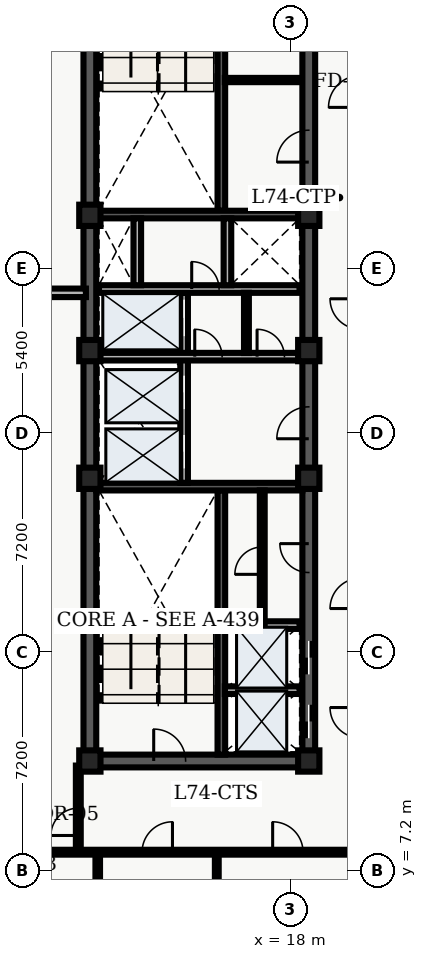
"""IFC4 building model, lengths in metres.
Left out: names, types, materials, properties, quantities, classifications, styles, units other than length and angle.
Written with IfcOpenShell. Run it as: python <this file> out.ifc"""

import sys

from ifc_helpers import new_model, entity, si_unit, converted_unit, direction, frame, origin_with_axes, origin_2d_with_axis, place, context, subcontext, project, spatial, polyline, rectangle, outline, extrude, element, fill, save


model = new_model("IFC4")
c1 = context("Model", 3, precision=1e-05, world=origin_with_axes(), true_north=direction((0.0, 1.0)))
c2 = subcontext(c1, "Body", "Model", "MODEL_VIEW")
j1 = project(units=[si_unit("LENGTHUNIT", "METRE"), converted_unit("PLANEANGLEUNIT", "DEGREE", entity("IfcPlaneAngleMeasure", 0.017), si_unit("PLANEANGLEUNIT", "RADIAN"), dimensions=[0, 0, 0, 0, 0, 0, 0])], contexts=[c1])
p1 = place(None, origin_with_axes())
s1 = spatial("IfcSite", under=j1, at=p1, CompositionType="ELEMENT")
p2 = place(p1, origin_with_axes())
s2 = spatial("IfcBuilding", under=s1, at=p2, CompositionType="ELEMENT")
p3 = place(p2, frame((0.0, 0.0, 299.7), z_axis=(0.0, 0.0, 1.0), x_axis=(1.0, 0.0, 0.0)))
s3 = spatial("IfcBuildingStorey", under=s2, at=p3, CompositionType="ELEMENT", Elevation=299.7)
p4 = place(p3, frame((11.4, 10.8, 0.0), z_axis=(0.0, 0.0, 1.0), x_axis=(0.0, 1.0, 0.0)))
e1 = element("IfcWall", 1, at=p4, inside=s3, PredefinedType="SHEAR", context=c2, shape_type="SweptSolid", body=[
    extrude(outline(polyline([(0.0, -0.21), (27.0, -0.21), (27.0, 0.21), (0.0, 0.21), (0.0, -0.21)])), origin_with_axes(), (0.0, 0.0, 1.0), 3.6),
])
p5 = place(p3, frame((11.4, 10.8, 0.0), z_axis=(0.0, 0.0, 1.0), x_axis=(1.0, 0.0, 0.0)))
e2 = element("IfcWall", 2, at=p5, inside=s3, PredefinedType="SHEAR", context=c2, shape_type="SweptSolid", body=[
    extrude(outline(polyline([(0.0, -0.21), (7.2, -0.21), (7.2, 0.21), (0.0, 0.21), (0.0, -0.21)])), origin_with_axes(), (0.0, 0.0, 1.0), 3.6),
])
p6 = place(p5, frame((2.625, 0.0, 0.0), z_axis=(0.0, 0.0, 1.0), x_axis=(1.0, 0.0, 0.0)))
e3 = element("IfcOpeningElement", 3, at=p6, cuts=e2, PredefinedType="OPENING", context=c2, shape_type="SweptSolid", body=[
    extrude(rectangle(XDim=1.05, YDim=0.44, at=origin_2d_with_axis()), origin_with_axes(), (0.0, 0.0, 1.0), 2.15),
])
p7 = place(p3, frame((18.6, 10.8, 0.0), z_axis=(0.0, 0.0, 1.0), x_axis=(0.0, 1.0, 0.0)))
e4 = element("IfcWall", 4, at=p7, inside=s3, PredefinedType="SHEAR", context=c2, shape_type="SweptSolid", body=[
    extrude(outline(polyline([(0.0, -0.21), (13.5, -0.21), (13.5, 0.21), (0.0, 0.21), (0.0, -0.21)])), origin_with_axes(), (0.0, 0.0, 1.0), 3.6),
])
p8 = place(p7, frame((1.3, 0.0, 0.0), z_axis=(0.0, 0.0, 1.0), x_axis=(1.0, 0.0, 0.0)))
e5 = element("IfcOpeningElement", 5, at=p8, cuts=e4, PredefinedType="OPENING", context=c2, shape_type="SweptSolid", body=[
    extrude(rectangle(XDim=1.1, YDim=0.44, at=origin_2d_with_axis()), origin_with_axes(), (0.0, 0.0, 1.0), 2.15),
])
p9 = place(p7, frame((3.4, 0.0, 0.0), z_axis=(0.0, 0.0, 1.0), x_axis=(1.0, 0.0, 0.0)))
e6 = element("IfcOpeningElement", 6, at=p9, cuts=e4, PredefinedType="OPENING", context=c2, shape_type="SweptSolid", body=[
    extrude(rectangle(XDim=1.1, YDim=0.44, at=origin_2d_with_axis()), origin_with_axes(), (0.0, 0.0, 1.0), 2.15),
])
p10 = place(p7, frame((11.125, 0.0, 0.0), z_axis=(0.0, 0.0, 1.0), x_axis=(1.0, 0.0, 0.0)))
e7 = element("IfcOpeningElement", 7, at=p10, cuts=e4, PredefinedType="OPENING", context=c2, shape_type="SweptSolid", body=[
    extrude(rectangle(XDim=1.05, YDim=0.44, at=origin_2d_with_axis()), origin_with_axes(), (0.0, 0.0, 1.0), 2.15),
])
p11 = place(p7, frame((6.675, 0.0, 0.0), z_axis=(0.0, 0.0, 1.0), x_axis=(1.0, 0.0, 0.0)))
e8 = element("IfcOpeningElement", 8, at=p11, cuts=e4, PredefinedType="OPENING", context=c2, shape_type="SweptSolid", body=[
    extrude(rectangle(XDim=0.95, YDim=0.44, at=origin_2d_with_axis()), origin_with_axes(), (0.0, 0.0, 1.0), 2.15),
])
p12 = place(p3, frame((18.6, 24.3, 0.0), z_axis=(0.0, 0.0, 1.0), x_axis=(0.0, 1.0, 0.0)))
e9 = element("IfcWall", 9, at=p12, inside=s3, PredefinedType="SHEAR", context=c2, shape_type="SweptSolid", body=[
    extrude(outline(polyline([(0.0, -0.21), (13.5, -0.21), (13.5, 0.21), (0.0, 0.21), (0.0, -0.21)])), origin_with_axes(), (0.0, 0.0, 1.0), 3.6),
])
p13 = place(p12, frame((6.725, 0.0, 0.0), z_axis=(0.0, 0.0, 1.0), x_axis=(1.0, 0.0, 0.0)))
e10 = element("IfcOpeningElement", 10, at=p13, cuts=e9, PredefinedType="OPENING", context=c2, shape_type="SweptSolid", body=[
    extrude(rectangle(XDim=1.05, YDim=0.44, at=origin_2d_with_axis()), origin_with_axes(), (0.0, 0.0, 1.0), 2.15),
])
p14 = place(p12, frame((11.125, 0.0, 0.0), z_axis=(0.0, 0.0, 1.0), x_axis=(1.0, 0.0, 0.0)))
e11 = element("IfcOpeningElement", 11, at=p14, cuts=e9, PredefinedType="OPENING", context=c2, shape_type="SweptSolid", body=[
    extrude(rectangle(XDim=1.05, YDim=0.44, at=origin_2d_with_axis()), origin_with_axes(), (0.0, 0.0, 1.0), 2.15),
])
p15 = place(p3, frame((15.725, 11.01, 0.0), z_axis=(0.0, 0.0, 1.0), x_axis=(0.0, 1.0, 0.0)))
e12 = element("IfcWall", 12, at=p15, inside=s3, PredefinedType="SHEAR", context=c2, shape_type="SweptSolid", body=[
    extrude(outline(polyline([(0.0, -0.125), (8.69, -0.125), (8.69, 0.125), (0.0, 0.125), (0.0, -0.125)])), origin_with_axes(), (0.0, 0.0, 1.0), 3.6),
])
p16 = place(p3, frame((11.61, 19.825, 0.0), z_axis=(0.0, 0.0, 1.0), x_axis=(1.0, 0.0, 0.0)))
e13 = element("IfcWall", 13, at=p16, inside=s3, PredefinedType="SHEAR", context=c2, shape_type="SweptSolid", body=[
    extrude(outline(polyline([(0.0, -0.125), (6.78, -0.125), (6.78, 0.125), (0.0, 0.125), (0.0, -0.125)])), origin_with_axes(), (0.0, 0.0, 1.0), 3.6),
])
p17 = place(p3, frame((15.725, 28.9, 0.0), z_axis=(0.0, 0.0, 1.0), x_axis=(0.0, 1.0, 0.0)))
e14 = element("IfcWall", 14, at=p17, inside=s3, PredefinedType="SHEAR", context=c2, shape_type="SweptSolid", body=[
    extrude(outline(polyline([(0.0, -0.125), (8.69, -0.125), (8.69, 0.125), (0.0, 0.125), (0.0, -0.125)])), origin_with_axes(), (0.0, 0.0, 1.0), 3.6),
])
p18 = place(p3, frame((11.61, 28.775, 0.0), z_axis=(0.0, 0.0, 1.0), x_axis=(1.0, 0.0, 0.0)))
e15 = element("IfcWall", 15, at=p18, inside=s3, PredefinedType="SHEAR", context=c2, shape_type="SweptSolid", body=[
    extrude(outline(polyline([(0.0, -0.125), (6.78, -0.125), (6.78, 0.125), (0.0, 0.125), (0.0, -0.125)])), origin_with_axes(), (0.0, 0.0, 1.0), 3.6),
])
p19 = place(p3, frame((14.5, 19.95, 0.0), z_axis=(0.0, 0.0, 1.0), x_axis=(0.0, 1.0, 0.0)))
e16 = element("IfcWall", 16, at=p19, inside=s3, PredefinedType="SOLIDWALL", context=c2, shape_type="SweptSolid", body=[
    extrude(outline(polyline([(0.0, -0.125), (6.25, -0.125), (6.25, 0.125), (0.0, 0.125), (0.0, -0.125)])), origin_with_axes(), (0.0, 0.0, 1.0), 2.64),
])
p20 = place(p19, frame((1.025, 0.0, 0.0), z_axis=(0.0, 0.0, 1.0), x_axis=(1.0, 0.0, 0.0)))
e17 = element("IfcOpeningElement", 17, at=p20, cuts=e16, PredefinedType="OPENING", context=c2, shape_type="SweptSolid", body=[
    extrude(rectangle(XDim=1.1, YDim=0.27, at=origin_2d_with_axis()), origin_with_axes(), (0.0, 0.0, 1.0), 2.15),
])
p21 = place(p19, frame((2.975, 0.0, 0.0), z_axis=(0.0, 0.0, 1.0), x_axis=(1.0, 0.0, 0.0)))
e18 = element("IfcOpeningElement", 18, at=p21, cuts=e16, PredefinedType="OPENING", context=c2, shape_type="SweptSolid", body=[
    extrude(rectangle(XDim=1.1, YDim=0.27, at=origin_2d_with_axis()), origin_with_axes(), (0.0, 0.0, 1.0), 2.15),
])
p22 = place(p19, frame((5.425, 0.0, 0.0), z_axis=(0.0, 0.0, 1.0), x_axis=(1.0, 0.0, 0.0)))
e19 = element("IfcOpeningElement", 19, at=p22, cuts=e16, PredefinedType="OPENING", context=c2, shape_type="SweptSolid", body=[
    extrude(rectangle(XDim=1.2, YDim=0.27, at=origin_2d_with_axis()), origin_with_axes(), (0.0, 0.0, 1.0), 2.15),
])
p23 = place(p3, frame((11.7, 24.1, 0.0), z_axis=(0.0, 0.0, 1.0), x_axis=(1.0, 0.0, 0.0)))
e20 = element("IfcWall", 20, at=p23, inside=s3, PredefinedType="SOLIDWALL", context=c2, shape_type="SweptSolid", body=[
    extrude(outline(polyline([(0.0, -0.125), (6.6, -0.125), (6.6, 0.125), (0.0, 0.125), (0.0, -0.125)])), origin_with_axes(), (0.0, 0.0, 1.0), 2.64),
])
p24 = place(p23, frame((3.6, 0.0, 0.0), z_axis=(0.0, 0.0, 1.0), x_axis=(1.0, 0.0, 0.0)))
e21 = element("IfcOpeningElement", 21, at=p24, cuts=e20, PredefinedType="OPENING", context=c2, shape_type="SweptSolid", body=[
    extrude(rectangle(XDim=0.9, YDim=0.27, at=origin_2d_with_axis()), origin_with_axes(), (0.0, 0.0, 1.0), 2.15),
])
p25 = place(p23, frame((5.65, 0.0, 0.0), z_axis=(0.0, 0.0, 1.0), x_axis=(1.0, 0.0, 0.0)))
e22 = element("IfcOpeningElement", 22, at=p25, cuts=e20, PredefinedType="OPENING", context=c2, shape_type="SweptSolid", body=[
    extrude(rectangle(XDim=0.9, YDim=0.27, at=origin_2d_with_axis()), origin_with_axes(), (0.0, 0.0, 1.0), 2.15),
])
p26 = place(p3, frame((11.7, 26.325, 0.0), z_axis=(0.0, 0.0, 1.0), x_axis=(1.0, 0.0, 0.0)))
e23 = element("IfcWall", 23, at=p26, inside=s3, PredefinedType="SOLIDWALL", context=c2, shape_type="SweptSolid", body=[
    extrude(outline(polyline([(0.0, -0.125), (6.6, -0.125), (6.6, 0.125), (0.0, 0.125), (0.0, -0.125)])), origin_with_axes(), (0.0, 0.0, 1.0), 2.64),
])
p27 = place(p26, frame((3.5, 0.0, 0.0), z_axis=(0.0, 0.0, 1.0), x_axis=(1.0, 0.0, 0.0)))
e24 = element("IfcOpeningElement", 24, at=p27, cuts=e23, PredefinedType="OPENING", context=c2, shape_type="SweptSolid", body=[
    extrude(rectangle(XDim=0.9, YDim=0.27, at=origin_2d_with_axis()), origin_with_axes(), (0.0, 0.0, 1.0), 2.15),
])
for number, where, z_axis, x_axis in (
    (25, (12.96, 26.45, 0.0), (0.0, 0.0, 1.0), (0.0, 1.0, 0.0)),
    (26, (15.925, 26.45, 0.0), (0.0, 0.0, 1.0), (0.0, 1.0, 0.0)),
):
    element("IfcWall", number, at=place(p3, frame(where, z_axis=z_axis, x_axis=x_axis)), inside=s3, PredefinedType="SOLIDWALL", context=c2, shape_type="SweptSolid", body=[
        extrude(outline(polyline([(0.0, -0.125), (2.2, -0.125), (2.2, 0.125), (0.0, 0.125), (0.0, -0.125)])), origin_with_axes(), (0.0, 0.0, 1.0), 2.64),
    ])
for number, where, z_axis, x_axis in (
    (27, (11.4, 10.8, 0.0), (0.0, 0.0, 1.0), (1.0, 0.0, 0.0)),
    (28, (11.4, 20.1, 0.0), (0.0, 0.0, 1.0), (1.0, 0.0, 0.0)),
    (29, (11.4, 24.3, 0.0), (0.0, 0.0, 1.0), (1.0, 0.0, 0.0)),
    (30, (11.4, 28.75, 0.0), (0.0, 0.0, 1.0), (1.0, 0.0, 0.0)),
    (31, (18.6, 10.8, 0.0), (0.0, 0.0, 1.0), (1.0, 0.0, 0.0)),
    (32, (18.6, 20.1, 0.0), (0.0, 0.0, 1.0), (1.0, 0.0, 0.0)),
    (33, (18.6, 24.3, 0.0), (0.0, 0.0, 1.0), (1.0, 0.0, 0.0)),
    (34, (18.6, 28.75, 0.0), (0.0, 0.0, 1.0), (1.0, 0.0, 0.0)),
):
    element("IfcColumn", number, at=place(p3, frame(where, z_axis=z_axis, x_axis=x_axis)), inside=s3, PredefinedType="COLUMN", context=c2, shape_type="SweptSolid", body=[
        extrude(rectangle(XDim=0.7, YDim=0.7, at=origin_2d_with_axis()), origin_with_axes(), (0.0, 0.0, 1.0), 3.9),
    ])
p28 = place(p3, frame((16.55, 24.22, 0.0), z_axis=(0.0, 0.0, 1.0), x_axis=(0.0, 1.0, 0.0)))
e35 = element("IfcWall", 35, at=p28, inside=s3, PredefinedType="PARTITIONING", context=c2, shape_type="SweptSolid", body=[
    extrude(outline(polyline([(0.0, -0.08), (1.98, -0.08), (1.98, 0.08), (0.0, 0.08), (0.0, -0.08)])), origin_with_axes(), (0.0, 0.0, 1.0), 2.64),
])
for number, where, z_axis, x_axis in (
    (36, (15.84, 13.13, 0.0), (0.0, 0.0, 1.0), (1.0, 0.0, 0.0)),
    (37, (15.84, 15.27, 0.0), (0.0, 0.0, 1.0), (1.0, 0.0, 0.0)),
):
    element("IfcWall", number, at=place(p3, frame(where, z_axis=z_axis, x_axis=x_axis)), inside=s3, PredefinedType="SOLIDWALL", context=c2, shape_type="SweptSolid", body=[
        extrude(outline(polyline([(0.0, -0.125), (2.46, -0.125), (2.46, 0.125), (0.0, 0.125), (0.0, -0.125)])), origin_with_axes(), (0.0, 0.0, 1.0), 2.64),
    ])
p29 = place(p3, frame((17.07, 15.34, 0.0), z_axis=(0.0, 0.0, 1.0), x_axis=(0.0, 1.0, 0.0)))
e38 = element("IfcWall", 38, at=p29, inside=s3, PredefinedType="PARTITIONING", context=c2, shape_type="SweptSolid", body=[
    extrude(outline(polyline([(0.0, -0.08), (4.36, -0.08), (4.36, 0.08), (0.0, 0.08), (0.0, -0.08)])), origin_with_axes(), (0.0, 0.0, 1.0), 2.64),
])
p30 = place(p29, frame((2.05, 0.0, 0.0), z_axis=(0.0, 0.0, 1.0), x_axis=(1.0, 0.0, 0.0)))
e39 = element("IfcOpeningElement", 39, at=p30, cuts=e38, PredefinedType="OPENING", context=c2, shape_type="SweptSolid", body=[
    extrude(rectangle(XDim=0.9, YDim=0.18, at=origin_2d_with_axis()), origin_with_axes(), (0.0, 0.0, 1.0), 2.15),
])
p31 = place(p3, frame((15.84, 33.2, 0.0), z_axis=(0.0, 0.0, 1.0), x_axis=(1.0, 0.0, 0.0)))
e40 = element("IfcWall", 40, at=p31, inside=s3, PredefinedType="PARTITIONING", context=c2, shape_type="SweptSolid", body=[
    extrude(outline(polyline([(0.0, -0.07), (2.46, -0.07), (2.46, 0.07), (0.0, 0.07), (0.0, -0.07)])), origin_with_axes(), (0.0, 0.0, 1.0), 2.64),
])
p32 = place(p3, frame((8.135, 7.8, 0.0), z_axis=(0.0, 0.0, 1.0), x_axis=(1.0, 0.0, 0.0)))
e41 = element("IfcWall", 41, at=p32, inside=s3, PredefinedType="PARTITIONING", context=c2, shape_type="SweptSolid", body=[
    extrude(outline(polyline([(0.0, -0.08), (12.165, -0.08), (12.165, 0.08), (0.0, 0.08), (0.0, -0.08)])), origin_with_axes(), (0.0, 0.0, 1.0), 2.64),
])
p33 = place(p32, frame((0.89, 0.0, 0.0), z_axis=(0.0, 0.0, 1.0), x_axis=(1.0, 0.0, 0.0)))
e42 = element("IfcOpeningElement", 42, at=p33, cuts=e41, PredefinedType="OPENING", context=c2, shape_type="SweptSolid", body=[
    extrude(rectangle(XDim=1.0, YDim=0.18, at=origin_2d_with_axis()), origin_with_axes(), (0.0, 0.0, 1.0), 2.15),
])
p34 = place(p32, frame((5.482, 0.0, 0.0), z_axis=(0.0, 0.0, 1.0), x_axis=(1.0, 0.0, 0.0)))
e43 = element("IfcOpeningElement", 43, at=p34, cuts=e41, PredefinedType="OPENING", context=c2, shape_type="SweptSolid", body=[
    extrude(rectangle(XDim=1.0, YDim=0.18, at=origin_2d_with_axis()), origin_with_axes(), (0.0, 0.0, 1.0), 2.15),
])
p35 = place(p32, frame((9.777, 0.0, 0.0), z_axis=(0.0, 0.0, 1.0), x_axis=(1.0, 0.0, 0.0)))
e44 = element("IfcOpeningElement", 44, at=p35, cuts=e41, PredefinedType="OPENING", context=c2, shape_type="SweptSolid", body=[
    extrude(rectangle(XDim=1.0, YDim=0.18, at=origin_2d_with_axis()), origin_with_axes(), (0.0, 0.0, 1.0), 2.15),
])
p36 = place(p3, frame((11.02, 7.8, 0.0), z_axis=(0.0, 0.0, 1.0), x_axis=(0.0, 1.0, 0.0)))
e45 = element("IfcWall", 45, at=p36, inside=s3, PredefinedType="PARTITIONING", context=c2, shape_type="SweptSolid", body=[
    extrude(outline(polyline([(0.0, -0.08), (2.85, -0.08), (2.85, 0.08), (0.0, 0.08), (0.0, -0.08)])), origin_with_axes(), (0.0, 0.0, 1.0), 2.64),
])
p37 = place(p36, frame((1.0, 0.0, 0.0), z_axis=(0.0, 0.0, 1.0), x_axis=(1.0, 0.0, 0.0)))
e46 = element("IfcOpeningElement", 46, at=p37, cuts=e45, PredefinedType="OPENING", context=c2, shape_type="SweptSolid", body=[
    extrude(rectangle(XDim=0.9, YDim=0.18, at=origin_2d_with_axis()), origin_with_axes(), (0.0, 0.0, 1.0), 2.15),
])
p38 = place(p3, frame((8.135, 26.2, 0.0), z_axis=(0.0, 0.0, 1.0), x_axis=(1.0, 0.0, 0.0)))
e47 = element("IfcWall", 47, at=p38, inside=s3, PredefinedType="PARTITIONING", context=c2, shape_type="SweptSolid", body=[
    extrude(outline(polyline([(0.0, -0.14), (3.135, -0.14), (3.135, 0.14), (0.0, 0.14), (0.0, -0.14)])), origin_with_axes(), (0.0, 0.0, 1.0), 2.64),
])
p39 = place(p3, frame((11.659, 2.135, 0.0), z_axis=(0.0, 0.0, 1.0), x_axis=(0.0, 1.0, 0.0)))
e48 = element("IfcWall", 48, at=p39, inside=s3, PredefinedType="PARTITIONING", context=c2, shape_type="SweptSolid", body=[
    extrude(outline(polyline([(0.0, -0.075), (5.565, -0.075), (5.565, 0.075), (0.0, 0.075), (0.0, -0.075)])), origin_with_axes(), (0.0, 0.0, 1.0), 2.64),
])
p40 = place(p3, frame((15.575, 2.135, 0.0), z_axis=(0.0, 0.0, 1.0), x_axis=(0.0, 1.0, 0.0)))
e49 = element("IfcWall", 49, at=p40, inside=s3, PredefinedType="PARTITIONING", context=c2, shape_type="SweptSolid", body=[
    extrude(outline(polyline([(0.0, -0.062), (5.565, -0.062), (5.565, 0.062), (0.0, 0.062), (0.0, -0.062)])), origin_with_axes(), (0.0, 0.0, 1.0), 2.64),
])
p41 = place(p7, frame((1.3, 0.0, 0.0), z_axis=(0.0, 0.0, 1.0), x_axis=(1.0, 0.0, 0.0)))
e50 = element("IfcDoor", 50, at=p41, inside=s3, OperationType="SLIDING_TO_LEFT", PredefinedType="DOOR", context=c2, shape_type="SweptSolid", body=[
    extrude(rectangle(XDim=1.1, YDim=0.09, at=origin_2d_with_axis()), origin_with_axes(), (0.0, 0.0, 1.0), 2.15),
])
fill(e5, e50)
p42 = place(p7, frame((3.4, 0.0, 0.0), z_axis=(0.0, 0.0, 1.0), x_axis=(1.0, 0.0, 0.0)))
e51 = element("IfcDoor", 51, at=p42, inside=s3, OperationType="SLIDING_TO_RIGHT", PredefinedType="DOOR", context=c2, shape_type="SweptSolid", body=[
    extrude(rectangle(XDim=1.1, YDim=0.09, at=origin_2d_with_axis()), origin_with_axes(), (0.0, 0.0, 1.0), 2.15),
])
fill(e6, e51)
p43 = place(p19, frame((1.025, 0.0, 0.0), z_axis=(0.0, 0.0, 1.0), x_axis=(1.0, 0.0, 0.0)))
e52 = element("IfcDoor", 52, at=p43, inside=s3, OperationType="SLIDING_TO_LEFT", PredefinedType="DOOR", context=c2, shape_type="SweptSolid", body=[
    extrude(rectangle(XDim=1.1, YDim=0.09, at=origin_2d_with_axis()), origin_with_axes(), (0.0, 0.0, 1.0), 2.15),
])
fill(e17, e52)
p44 = place(p19, frame((2.975, 0.0, 0.0), z_axis=(0.0, 0.0, 1.0), x_axis=(1.0, 0.0, 0.0)))
e53 = element("IfcDoor", 53, at=p44, inside=s3, OperationType="SLIDING_TO_RIGHT", PredefinedType="DOOR", context=c2, shape_type="SweptSolid", body=[
    extrude(rectangle(XDim=1.1, YDim=0.09, at=origin_2d_with_axis()), origin_with_axes(), (0.0, 0.0, 1.0), 2.15),
])
fill(e18, e53)
p45 = place(p19, frame((5.425, 0.0, 0.0), z_axis=(0.0, 0.0, 1.0), x_axis=(1.0, 0.0, 0.0)))
e54 = element("IfcDoor", 54, at=p45, inside=s3, OperationType="DOUBLE_DOOR_SLIDING", PredefinedType="DOOR", context=c2, shape_type="SweptSolid", body=[
    extrude(rectangle(XDim=1.2, YDim=0.09, at=origin_2d_with_axis()), origin_with_axes(), (0.0, 0.0, 1.0), 2.15),
])
fill(e19, e54)
p46 = place(p5, frame((2.625, 0.0, 0.0), z_axis=(0.0, 0.0, 1.0), x_axis=(1.0, 0.0, 0.0)))
e55 = element("IfcDoor", 55, at=p46, inside=s3, OperationType="SINGLE_SWING_LEFT", PredefinedType="DOOR", context=c2, shape_type="SweptSolid", body=[
    extrude(rectangle(XDim=1.05, YDim=0.09, at=origin_2d_with_axis()), origin_with_axes(), (0.0, 0.0, 1.0), 2.15),
])
fill(e3, e55)
p47 = place(p7, frame((11.125, 0.0, 0.0), z_axis=(0.0, 0.0, 1.0), x_axis=(1.0, 0.0, 0.0)))
e56 = element("IfcDoor", 56, at=p47, inside=s3, OperationType="SINGLE_SWING_LEFT", PredefinedType="DOOR", context=c2, shape_type="SweptSolid", body=[
    extrude(rectangle(XDim=1.05, YDim=0.09, at=origin_2d_with_axis()), origin_with_axes(), (0.0, 0.0, 1.0), 2.15),
])
fill(e7, e56)
p48 = place(p23, frame((3.6, 0.0, 0.0), z_axis=(0.0, 0.0, 1.0), x_axis=(1.0, 0.0, 0.0)))
e57 = element("IfcDoor", 57, at=p48, inside=s3, OperationType="SINGLE_SWING_LEFT", PredefinedType="DOOR", context=c2, shape_type="SweptSolid", body=[
    extrude(rectangle(XDim=0.9, YDim=0.09, at=origin_2d_with_axis()), origin_with_axes(), (0.0, 0.0, 1.0), 2.15),
])
fill(e21, e57)
p49 = place(p23, frame((5.65, 0.0, 0.0), z_axis=(0.0, 0.0, 1.0), x_axis=(1.0, 0.0, 0.0)))
e58 = element("IfcDoor", 58, at=p49, inside=s3, OperationType="SINGLE_SWING_LEFT", PredefinedType="DOOR", context=c2, shape_type="SweptSolid", body=[
    extrude(rectangle(XDim=0.9, YDim=0.09, at=origin_2d_with_axis()), origin_with_axes(), (0.0, 0.0, 1.0), 2.15),
])
fill(e22, e58)
p50 = place(p26, frame((3.5, 0.0, 0.0), z_axis=(0.0, 0.0, 1.0), x_axis=(1.0, 0.0, 0.0)))
e59 = element("IfcDoor", 59, at=p50, inside=s3, OperationType="SINGLE_SWING_LEFT", PredefinedType="DOOR", context=c2, shape_type="SweptSolid", body=[
    extrude(rectangle(XDim=0.9, YDim=0.09, at=origin_2d_with_axis()), origin_with_axes(), (0.0, 0.0, 1.0), 2.15),
])
fill(e24, e59)
p51 = place(p29, frame((2.05, 0.0, 0.0), z_axis=(0.0, 0.0, 1.0), x_axis=(1.0, 0.0, 0.0)))
e60 = element("IfcDoor", 60, at=p51, inside=s3, OperationType="SINGLE_SWING_LEFT", PredefinedType="DOOR", context=c2, shape_type="SweptSolid", body=[
    extrude(rectangle(XDim=0.9, YDim=0.09, at=origin_2d_with_axis()), origin_with_axes(), (0.0, 0.0, 1.0), 2.15),
])
fill(e39, e60)
p52 = place(p7, frame((6.675, 0.0, 0.0), z_axis=(0.0, 0.0, 1.0), x_axis=(1.0, 0.0, 0.0)))
e61 = element("IfcDoor", 61, at=p52, inside=s3, OperationType="SINGLE_SWING_RIGHT", PredefinedType="DOOR", context=c2, shape_type="SweptSolid", body=[
    extrude(rectangle(XDim=0.95, YDim=0.09, at=origin_2d_with_axis()), origin_with_axes(), (0.0, 0.0, 1.0), 2.15),
])
fill(e8, e61)
p53 = place(p12, frame((6.725, 0.0, 0.0), z_axis=(0.0, 0.0, 1.0), x_axis=(1.0, 0.0, 0.0)))
e62 = element("IfcDoor", 62, at=p53, inside=s3, OperationType="SINGLE_SWING_LEFT", PredefinedType="DOOR", context=c2, shape_type="SweptSolid", body=[
    extrude(rectangle(XDim=1.05, YDim=0.09, at=origin_2d_with_axis()), origin_with_axes(), (0.0, 0.0, 1.0), 2.15),
])
fill(e10, e62)
p54 = place(p36, frame((1.0, 0.0, 0.0), z_axis=(0.0, 0.0, 1.0), x_axis=(1.0, 0.0, 0.0)))
e63 = element("IfcDoor", 63, at=p54, inside=s3, OperationType="SINGLE_SWING_LEFT", PredefinedType="DOOR", context=c2, shape_type="SweptSolid", body=[
    extrude(rectangle(XDim=0.9, YDim=0.09, at=origin_2d_with_axis()), origin_with_axes(), (0.0, 0.0, 1.0), 2.15),
])
fill(e46, e63)
p55 = place(p32, frame((5.482, 0.0, 0.0), z_axis=(0.0, 0.0, 1.0), x_axis=(1.0, 0.0, 0.0)))
e64 = element("IfcDoor", 64, at=p55, inside=s3, OperationType="SINGLE_SWING_RIGHT", PredefinedType="DOOR", context=c2, shape_type="SweptSolid", body=[
    extrude(rectangle(XDim=1.0, YDim=0.09, at=origin_2d_with_axis()), origin_with_axes(), (0.0, 0.0, 1.0), 2.15),
])
fill(e43, e64)
p56 = place(p32, frame((9.777, 0.0, 0.0), z_axis=(0.0, 0.0, 1.0), x_axis=(1.0, 0.0, 0.0)))
e65 = element("IfcDoor", 65, at=p56, inside=s3, OperationType="SINGLE_SWING_LEFT", PredefinedType="DOOR", context=c2, shape_type="SweptSolid", body=[
    extrude(rectangle(XDim=1.0, YDim=0.09, at=origin_2d_with_axis()), origin_with_axes(), (0.0, 0.0, 1.0), 2.15),
])
fill(e44, e65)
save(model, sys.argv[1])
